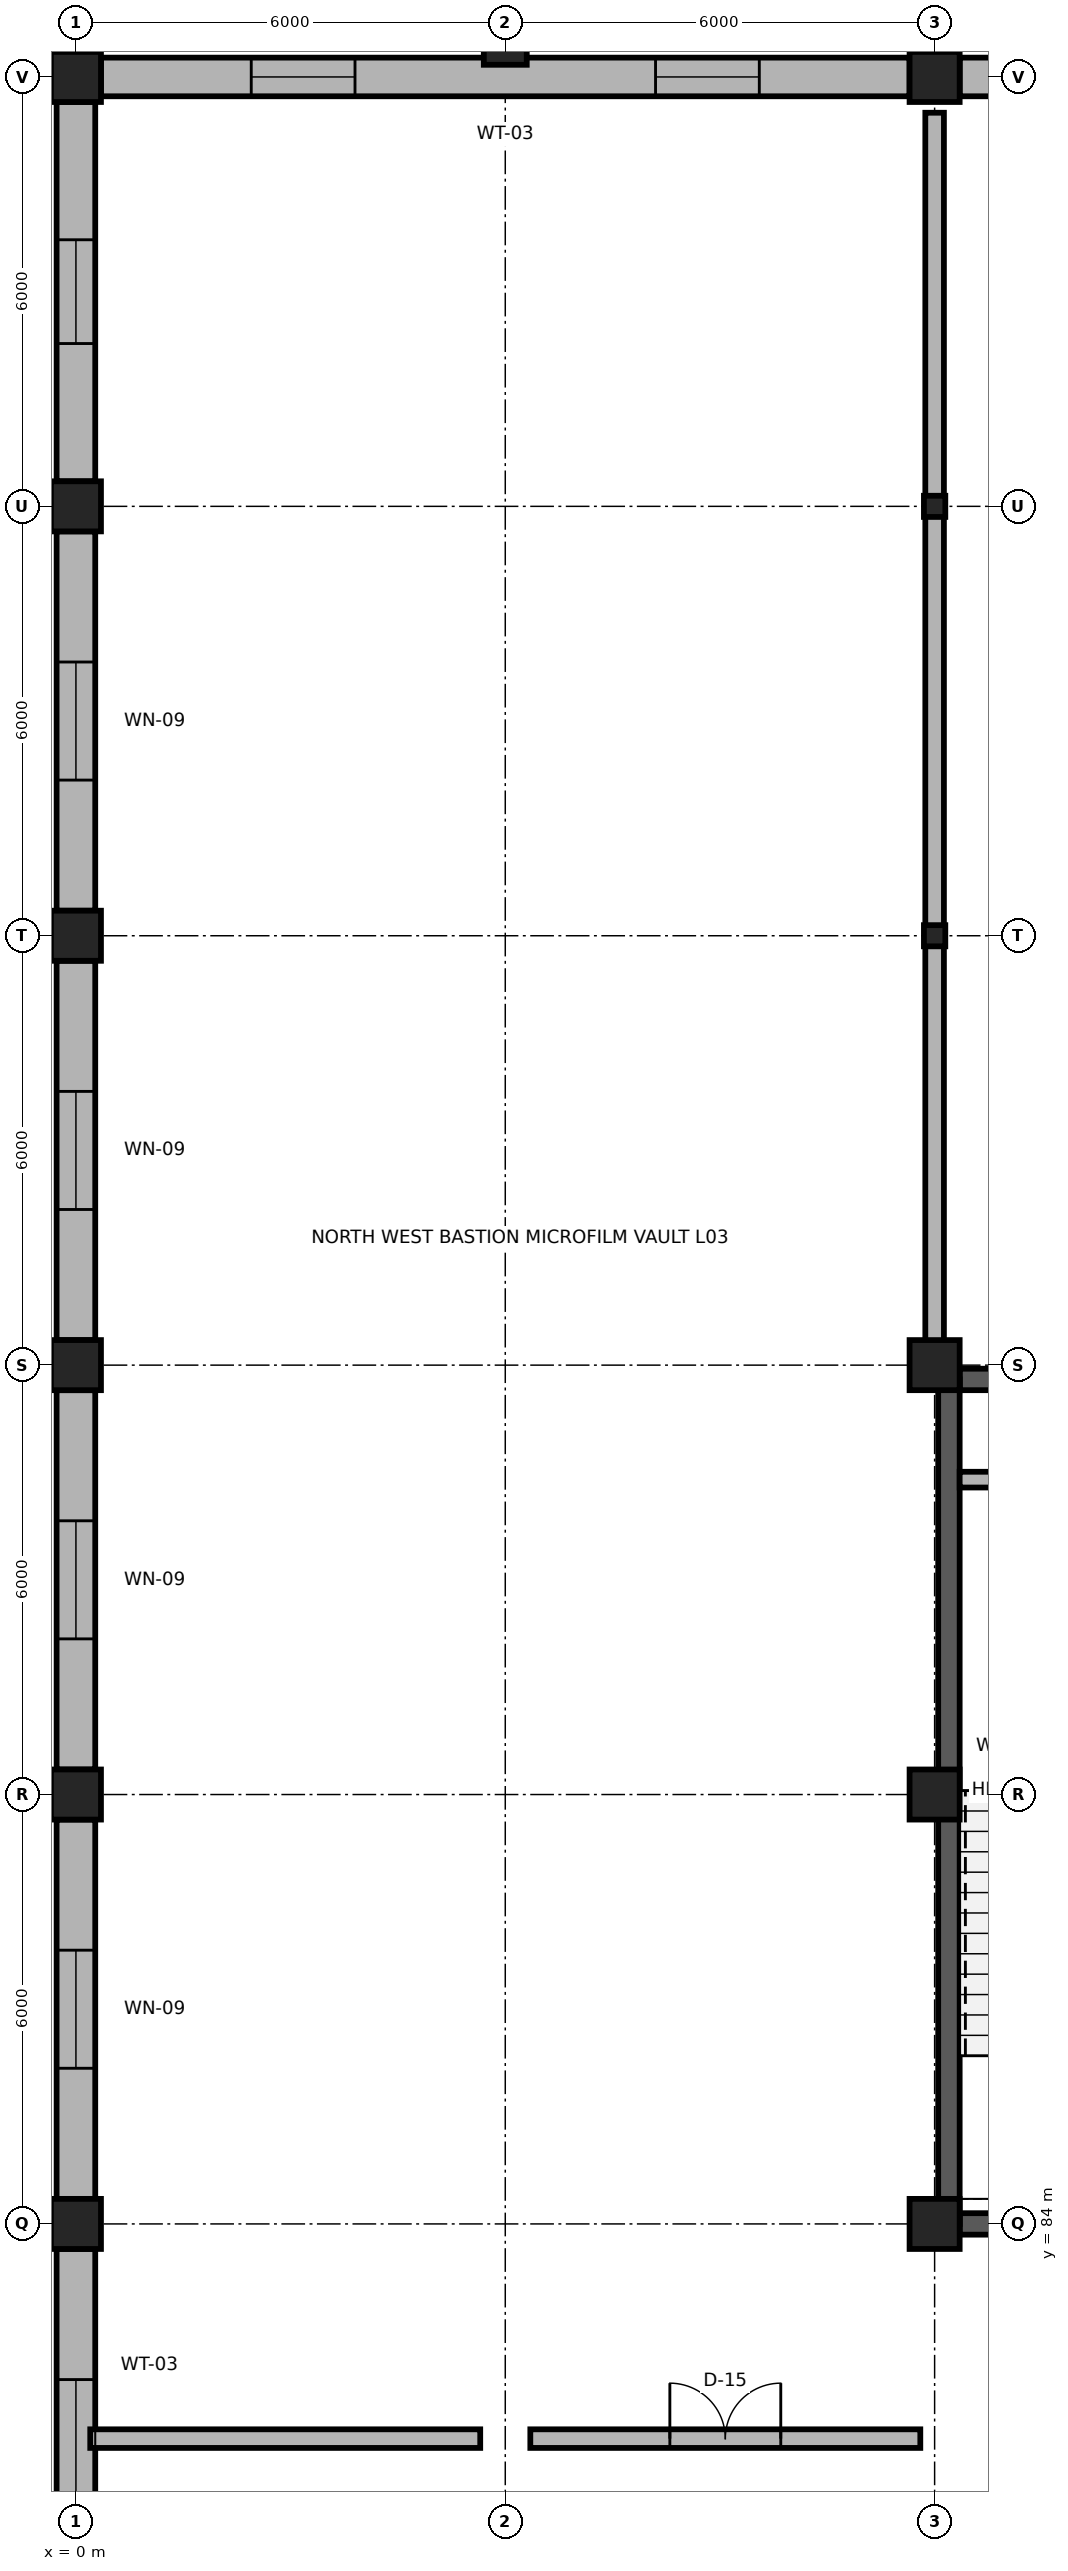
"""IFC4 building model, lengths in metres.
Left out: names, types, materials, properties, quantities, classifications, styles, units other than length and angle.
Written with IfcOpenShell. Run it as: python <this file> out.ifc"""

import sys

from ifc_helpers import new_model, si_unit, direction, frame, frame_2d, origin, origin_2d, place, context, subcontext, project, spatial, rectangle, i_section, extrude, element, fill, save


model = new_model("IFC4")
c1 = context("Model", 3, precision=1e-05, world=origin(), true_north=direction((0.0, 1.0)))
c2 = subcontext(c1, "Body", "Model", "MODEL_VIEW")
j1 = project(units=[si_unit("LENGTHUNIT", "METRE"), si_unit("PLANEANGLEUNIT", "RADIAN")], contexts=[c1])
p1 = place(None, origin())
s1 = spatial("IfcSite", under=j1, at=p1, CompositionType="ELEMENT")
p2 = place(p1, origin())
s2 = spatial("IfcBuilding", under=s1, at=p2, CompositionType="ELEMENT")
p3 = place(p2, frame((0.0, 0.0, 12.0)))
s3 = spatial("IfcBuildingStorey", under=s2, at=p3, CompositionType="ELEMENT", Elevation=12.0)
for number, where, z_axis, x_axis in (
    (1, (0.0, 84.0, 0.0), (0.0, 0.0, 1.0), (1.0, 0.0, 0.0)),
    (2, (12.0, 84.0, 0.0), (0.0, 0.0, 1.0), (1.0, 0.0, 0.0)),
    (3, (0.0, 90.0, 0.0), (0.0, 0.0, 1.0), (1.0, 0.0, 0.0)),
    (4, (12.0, 90.0, 0.0), (0.0, 0.0, 1.0), (1.0, 0.0, 0.0)),
    (5, (0.0, 96.0, 0.0), (0.0, 0.0, 1.0), (1.0, 0.0, 0.0)),
    (6, (12.0, 96.0, 0.0), (0.0, 0.0, 1.0), (1.0, 0.0, 0.0)),
    (7, (0.0, 102.0, 0.0), (0.0, 0.0, 1.0), (1.0, 0.0, 0.0)),
):
    element("IfcColumn", number, at=place(p3, frame(where, z_axis=z_axis, x_axis=x_axis)), inside=s3, PredefinedType="COLUMN", context=c2, shape_type="SweptSolid", body=[
        extrude(rectangle(XDim=0.7, YDim=0.7, at=origin_2d()), origin(), (0.0, 0.0, 1.0), 4.5),
    ])
p4 = place(p3, frame((12.0, 102.0, 0.0), z_axis=(0.0, 0.0, 1.0), x_axis=(1.0, 0.0, 0.0)))
e8 = element("IfcColumn", 8, at=p4, inside=s3, PredefinedType="COLUMN", context=c2, shape_type="SweptSolid", body=[
    extrude(i_section(OverallWidth=0.299, OverallDepth=0.296, WebThickness=0.009, FlangeThickness=0.014, FilletRadius=0.018, at=origin_2d()), origin(), (0.0, 0.0, 1.0), 4.5),
])
p5 = place(p3, frame((0.0, 108.0, 0.0), z_axis=(0.0, 0.0, 1.0), x_axis=(1.0, 0.0, 0.0)))
e9 = element("IfcColumn", 9, at=p5, inside=s3, PredefinedType="COLUMN", context=c2, shape_type="SweptSolid", body=[
    extrude(rectangle(XDim=0.7, YDim=0.7, at=origin_2d()), origin(), (0.0, 0.0, 1.0), 4.5),
])
p6 = place(p3, frame((12.0, 108.0, 0.0), z_axis=(0.0, 0.0, 1.0), x_axis=(1.0, 0.0, 0.0)))
e10 = element("IfcColumn", 10, at=p6, inside=s3, PredefinedType="COLUMN", context=c2, shape_type="SweptSolid", body=[
    extrude(i_section(OverallWidth=0.299, OverallDepth=0.296, WebThickness=0.009, FlangeThickness=0.014, FilletRadius=0.018, at=origin_2d()), origin(), (0.0, 0.0, 1.0), 4.5),
])
for number, where, z_axis, x_axis in (
    (11, (0.0, 114.0, 0.0), (0.0, 0.0, 1.0), (1.0, 0.0, 0.0)),
    (12, (12.0, 114.0, 0.0), (0.0, 0.0, 1.0), (1.0, 0.0, 0.0)),
):
    element("IfcColumn", number, at=place(p3, frame(where, z_axis=z_axis, x_axis=x_axis)), inside=s3, PredefinedType="COLUMN", context=c2, shape_type="SweptSolid", body=[
        extrude(rectangle(XDim=0.7, YDim=0.7, at=origin_2d()), origin(), (0.0, 0.0, 1.0), 4.5),
    ])
p7 = place(p3, frame((6.0, 114.35, 0.0), z_axis=(0.0, 0.0, 1.0), x_axis=(1.0, 0.0, 0.0)))
e13 = element("IfcColumn", 13, at=p7, inside=s3, PredefinedType="PILASTER", context=c2, shape_type="SweptSolid", body=[
    extrude(rectangle(XDim=0.6, YDim=0.36, at=origin_2d()), origin(), (0.0, 0.0, 1.0), 4.22),
])
p8 = place(p3, frame((0.35, 114.0, 0.0), z_axis=(0.0, 0.0, 1.0), x_axis=(1.0, 0.0, 0.0)))
e14 = element("IfcWall", 14, at=p8, inside=s3, PredefinedType="SOLIDWALL", context=c2, shape_type="SweptSolid", body=[
    extrude(rectangle(XDim=11.3, YDim=0.54, at=frame_2d((5.65, 0.0))), origin(), (0.0, 0.0, 1.0), 3.77),
])
p9 = place(p8, frame((2.1, 0.0, 0.85)))
e15 = element("IfcOpeningElement", 15, at=p9, cuts=e14, PredefinedType="OPENING", context=c2, shape_type="SweptSolid", body=[
    extrude(rectangle(XDim=1.45, YDim=2.15, at=frame_2d((0.725, 1.075))), frame((0.0, 0.285, 0.0), z_axis=(0.0, -1.0, 0.0), x_axis=(1.0, 0.0, 0.0)), (0.0, 0.0, 1.0), 0.57),
])
p10 = place(p8, frame((7.75, 0.0, 0.85)))
e16 = element("IfcOpeningElement", 16, at=p10, cuts=e14, PredefinedType="OPENING", context=c2, shape_type="SweptSolid", body=[
    extrude(rectangle(XDim=1.45, YDim=2.15, at=frame_2d((0.725, 1.075))), frame((0.0, 0.285, 0.0), z_axis=(0.0, -1.0, 0.0), x_axis=(1.0, 0.0, 0.0)), (0.0, 0.0, 1.0), 0.57),
])
p11 = place(p3, frame((12.35, 114.0, 0.0), z_axis=(0.0, 0.0, 1.0), x_axis=(1.0, 0.0, 0.0)))
e17 = element("IfcWall", 17, at=p11, inside=s3, PredefinedType="SOLIDWALL", context=c2, shape_type="SweptSolid", body=[
    extrude(rectangle(XDim=5.3, YDim=0.54, at=frame_2d((2.65, 0.0))), origin(), (0.0, 0.0, 1.0), 3.77),
])
p12 = place(p3, frame((0.0, 78.35, 0.0), z_axis=(0.0, 0.0, 1.0), x_axis=(0.0, 1.0, 0.0)))
e18 = element("IfcWall", 18, at=p12, inside=s3, PredefinedType="SOLIDWALL", context=c2, shape_type="SweptSolid", body=[
    extrude(rectangle(XDim=5.3, YDim=0.54, at=frame_2d((2.65, 0.0))), origin(), (0.0, 0.0, 1.0), 3.77),
])
p13 = place(p12, frame((1.825, 0.0, 0.85)))
e19 = element("IfcOpeningElement", 19, at=p13, cuts=e18, PredefinedType="OPENING", context=c2, shape_type="SweptSolid", body=[
    extrude(rectangle(XDim=1.65, YDim=2.3, at=frame_2d((0.825, 1.15))), frame((0.0, 0.285, 0.0), z_axis=(0.0, -1.0, 0.0), x_axis=(1.0, 0.0, 0.0)), (0.0, 0.0, 1.0), 0.57),
])
p14 = place(p3, frame((0.0, 84.35, 0.0), z_axis=(0.0, 0.0, 1.0), x_axis=(0.0, 1.0, 0.0)))
e20 = element("IfcWall", 20, at=p14, inside=s3, PredefinedType="SOLIDWALL", context=c2, shape_type="SweptSolid", body=[
    extrude(rectangle(XDim=5.3, YDim=0.54, at=frame_2d((2.65, 0.0))), origin(), (0.0, 0.0, 1.0), 3.77),
])
p15 = place(p14, frame((1.825, 0.0, 0.85)))
e21 = element("IfcOpeningElement", 21, at=p15, cuts=e20, PredefinedType="OPENING", context=c2, shape_type="SweptSolid", body=[
    extrude(rectangle(XDim=1.65, YDim=2.3, at=frame_2d((0.825, 1.15))), frame((0.0, 0.285, 0.0), z_axis=(0.0, -1.0, 0.0), x_axis=(1.0, 0.0, 0.0)), (0.0, 0.0, 1.0), 0.57),
])
p16 = place(p3, frame((0.0, 90.35, 0.0), z_axis=(0.0, 0.0, 1.0), x_axis=(0.0, 1.0, 0.0)))
e22 = element("IfcWall", 22, at=p16, inside=s3, PredefinedType="SOLIDWALL", context=c2, shape_type="SweptSolid", body=[
    extrude(rectangle(XDim=5.3, YDim=0.54, at=frame_2d((2.65, 0.0))), origin(), (0.0, 0.0, 1.0), 3.77),
])
p17 = place(p16, frame((1.825, 0.0, 0.85)))
e23 = element("IfcOpeningElement", 23, at=p17, cuts=e22, PredefinedType="OPENING", context=c2, shape_type="SweptSolid", body=[
    extrude(rectangle(XDim=1.65, YDim=2.3, at=frame_2d((0.825, 1.15))), frame((0.0, 0.285, 0.0), z_axis=(0.0, -1.0, 0.0), x_axis=(1.0, 0.0, 0.0)), (0.0, 0.0, 1.0), 0.57),
])
p18 = place(p3, frame((0.0, 96.35, 0.0), z_axis=(0.0, 0.0, 1.0), x_axis=(0.0, 1.0, 0.0)))
e24 = element("IfcWall", 24, at=p18, inside=s3, PredefinedType="SOLIDWALL", context=c2, shape_type="SweptSolid", body=[
    extrude(rectangle(XDim=5.3, YDim=0.54, at=frame_2d((2.65, 0.0))), origin(), (0.0, 0.0, 1.0), 3.77),
])
p19 = place(p18, frame((1.825, 0.0, 0.85)))
e25 = element("IfcOpeningElement", 25, at=p19, cuts=e24, PredefinedType="OPENING", context=c2, shape_type="SweptSolid", body=[
    extrude(rectangle(XDim=1.65, YDim=2.3, at=frame_2d((0.825, 1.15))), frame((0.0, 0.285, 0.0), z_axis=(0.0, -1.0, 0.0), x_axis=(1.0, 0.0, 0.0)), (0.0, 0.0, 1.0), 0.57),
])
p20 = place(p3, frame((0.0, 102.35, 0.0), z_axis=(0.0, 0.0, 1.0), x_axis=(0.0, 1.0, 0.0)))
e26 = element("IfcWall", 26, at=p20, inside=s3, PredefinedType="SOLIDWALL", context=c2, shape_type="SweptSolid", body=[
    extrude(rectangle(XDim=5.3, YDim=0.54, at=frame_2d((2.65, 0.0))), origin(), (0.0, 0.0, 1.0), 3.77),
])
p21 = place(p20, frame((1.825, 0.0, 0.85)))
e27 = element("IfcOpeningElement", 27, at=p21, cuts=e26, PredefinedType="OPENING", context=c2, shape_type="SweptSolid", body=[
    extrude(rectangle(XDim=1.65, YDim=2.3, at=frame_2d((0.825, 1.15))), frame((0.0, 0.285, 0.0), z_axis=(0.0, -1.0, 0.0), x_axis=(1.0, 0.0, 0.0)), (0.0, 0.0, 1.0), 0.57),
])
p22 = place(p3, frame((0.0, 108.35, 0.0), z_axis=(0.0, 0.0, 1.0), x_axis=(0.0, 1.0, 0.0)))
e28 = element("IfcWall", 28, at=p22, inside=s3, PredefinedType="SOLIDWALL", context=c2, shape_type="SweptSolid", body=[
    extrude(rectangle(XDim=5.3, YDim=0.54, at=frame_2d((2.65, 0.0))), origin(), (0.0, 0.0, 1.0), 3.77),
])
p23 = place(p22, frame((1.925, 0.0, 0.85)))
e29 = element("IfcOpeningElement", 29, at=p23, cuts=e28, PredefinedType="OPENING", context=c2, shape_type="SweptSolid", body=[
    extrude(rectangle(XDim=1.45, YDim=2.15, at=frame_2d((0.725, 1.075))), frame((0.0, 0.285, 0.0), z_axis=(0.0, -1.0, 0.0), x_axis=(1.0, 0.0, 0.0)), (0.0, 0.0, 1.0), 0.57),
])
p24 = place(p3, frame((12.35, 84.0, 0.0), z_axis=(0.0, 0.0, 1.0), x_axis=(1.0, 0.0, 0.0)))
e30 = element("IfcWall", 30, at=p24, inside=s3, PredefinedType="SHEAR", context=c2, shape_type="SweptSolid", body=[
    extrude(rectangle(XDim=5.3, YDim=0.3, at=frame_2d((2.65, 0.0))), origin(), (0.0, 0.0, 1.0), 4.22),
])
p25 = place(p24, frame((1.925, 0.0, 0.0)))
e31 = element("IfcOpeningElement", 31, at=p25, cuts=e30, PredefinedType="OPENING", context=c2, shape_type="SweptSolid", body=[
    extrude(rectangle(XDim=1.45, YDim=2.25, at=frame_2d((0.725, 1.125))), frame((0.0, 0.165, 0.0), z_axis=(0.0, -1.0, 0.0), x_axis=(1.0, 0.0, 0.0)), (0.0, 0.0, 1.0), 0.33),
])
p26 = place(p3, frame((12.35, 95.8, 0.0), z_axis=(0.0, 0.0, 1.0), x_axis=(1.0, 0.0, 0.0)))
e32 = element("IfcWall", 32, at=p26, inside=s3, PredefinedType="SHEAR", context=c2, shape_type="SweptSolid", body=[
    extrude(rectangle(XDim=5.3, YDim=0.3, at=frame_2d((2.65, 0.0))), origin(), (0.0, 0.0, 1.0), 4.22),
])
p27 = place(p3, frame((12.2, 84.0, 0.0), z_axis=(0.0, 0.0, 1.0), x_axis=(0.0, 1.0, 0.0)))
e33 = element("IfcWall", 33, at=p27, inside=s3, PredefinedType="SHEAR", context=c2, shape_type="SweptSolid", body=[
    extrude(rectangle(XDim=11.8, YDim=0.3, at=frame_2d((5.9, 0.0))), origin(), (0.0, 0.0, 1.0), 4.22),
])
p28 = place(p3, frame((12.35, 94.4, 0.0), z_axis=(0.0, 0.0, 1.0), x_axis=(1.0, 0.0, 0.0)))
e34 = element("IfcWall", 34, at=p28, inside=s3, PredefinedType="PARTITIONING", context=c2, shape_type="SweptSolid", body=[
    extrude(rectangle(XDim=1.1, YDim=0.22, at=frame_2d((0.55, 0.0))), origin(), (0.0, 0.0, 1.0), 4.22),
])
p29 = place(p3, frame((6.35, 81.0, 0.0), z_axis=(0.0, 0.0, 1.0), x_axis=(1.0, 0.0, 0.0)))
e35 = element("IfcWall", 35, at=p29, inside=s3, PredefinedType="PARTITIONING", context=c2, shape_type="SweptSolid", body=[
    extrude(rectangle(XDim=5.45, YDim=0.26, at=frame_2d((2.725, 0.0))), origin(), (0.0, 0.0, 1.0), 4.22),
])
p30 = place(p29, frame((1.95, 0.0, 0.0)))
e36 = element("IfcOpeningElement", 36, at=p30, cuts=e35, PredefinedType="OPENING", context=c2, shape_type="SweptSolid", body=[
    extrude(rectangle(XDim=1.55, YDim=2.3, at=frame_2d((0.775, 1.15))), frame((0.0, 0.145, 0.0), z_axis=(0.0, -1.0, 0.0), x_axis=(1.0, 0.0, 0.0)), (0.0, 0.0, 1.0), 0.29),
])
p31 = place(p3, frame((0.2, 81.0, 0.0), z_axis=(0.0, 0.0, 1.0), x_axis=(1.0, 0.0, 0.0)))
e37 = element("IfcWall", 37, at=p31, inside=s3, PredefinedType="PARTITIONING", context=c2, shape_type="SweptSolid", body=[
    extrude(rectangle(XDim=5.45, YDim=0.26, at=frame_2d((2.725, 0.0))), origin(), (0.0, 0.0, 1.0), 4.22),
])
p32 = place(p3, frame((12.0, 96.2, 0.0), z_axis=(0.0, 0.0, 1.0), x_axis=(0.0, 1.0, 0.0)))
e38 = element("IfcWall", 38, at=p32, inside=s3, PredefinedType="PARTITIONING", context=c2, shape_type="SweptSolid", body=[
    extrude(rectangle(XDim=17.3, YDim=0.26, at=frame_2d((8.65, 0.0))), origin(), (0.0, 0.0, 1.0), 3.738),
])
p33 = place(p9, origin())
e39 = element("IfcWindow", 39, at=p33, inside=s3, PartitioningType="SINGLE_PANEL", PredefinedType="WINDOW", context=c2, shape_type="SweptSolid", body=[
    extrude(rectangle(XDim=1.45, YDim=2.15, at=frame_2d((0.725, 1.075))), frame((0.0, 0.03, 0.0), z_axis=(0.0, -1.0, 0.0), x_axis=(1.0, 0.0, 0.0)), (0.0, 0.0, 1.0), 0.06),
])
fill(e15, e39)
p34 = place(p10, origin())
e40 = element("IfcWindow", 40, at=p34, inside=s3, PartitioningType="SINGLE_PANEL", PredefinedType="WINDOW", context=c2, shape_type="SweptSolid", body=[
    extrude(rectangle(XDim=1.45, YDim=2.15, at=frame_2d((0.725, 1.075))), frame((0.0, 0.03, 0.0), z_axis=(0.0, -1.0, 0.0), x_axis=(1.0, 0.0, 0.0)), (0.0, 0.0, 1.0), 0.06),
])
fill(e16, e40)
p35 = place(p13, origin())
e41 = element("IfcWindow", 41, at=p35, inside=s3, PartitioningType="SINGLE_PANEL", PredefinedType="WINDOW", context=c2, shape_type="SweptSolid", body=[
    extrude(rectangle(XDim=1.65, YDim=2.3, at=frame_2d((0.825, 1.15))), frame((0.0, 0.03, 0.0), z_axis=(0.0, -1.0, 0.0), x_axis=(1.0, 0.0, 0.0)), (0.0, 0.0, 1.0), 0.06),
])
fill(e19, e41)
p36 = place(p15, origin())
e42 = element("IfcWindow", 42, at=p36, inside=s3, PartitioningType="SINGLE_PANEL", PredefinedType="WINDOW", context=c2, shape_type="SweptSolid", body=[
    extrude(rectangle(XDim=1.65, YDim=2.3, at=frame_2d((0.825, 1.15))), frame((0.0, 0.03, 0.0), z_axis=(0.0, -1.0, 0.0), x_axis=(1.0, 0.0, 0.0)), (0.0, 0.0, 1.0), 0.06),
])
fill(e21, e42)
p37 = place(p17, origin())
e43 = element("IfcWindow", 43, at=p37, inside=s3, PartitioningType="SINGLE_PANEL", PredefinedType="WINDOW", context=c2, shape_type="SweptSolid", body=[
    extrude(rectangle(XDim=1.65, YDim=2.3, at=frame_2d((0.825, 1.15))), frame((0.0, 0.03, 0.0), z_axis=(0.0, -1.0, 0.0), x_axis=(1.0, 0.0, 0.0)), (0.0, 0.0, 1.0), 0.06),
])
fill(e23, e43)
p38 = place(p19, origin())
e44 = element("IfcWindow", 44, at=p38, inside=s3, PartitioningType="SINGLE_PANEL", PredefinedType="WINDOW", context=c2, shape_type="SweptSolid", body=[
    extrude(rectangle(XDim=1.65, YDim=2.3, at=frame_2d((0.825, 1.15))), frame((0.0, 0.03, 0.0), z_axis=(0.0, -1.0, 0.0), x_axis=(1.0, 0.0, 0.0)), (0.0, 0.0, 1.0), 0.06),
])
fill(e25, e44)
p39 = place(p21, origin())
e45 = element("IfcWindow", 45, at=p39, inside=s3, PartitioningType="SINGLE_PANEL", PredefinedType="WINDOW", context=c2, shape_type="SweptSolid", body=[
    extrude(rectangle(XDim=1.65, YDim=2.3, at=frame_2d((0.825, 1.15))), frame((0.0, 0.03, 0.0), z_axis=(0.0, -1.0, 0.0), x_axis=(1.0, 0.0, 0.0)), (0.0, 0.0, 1.0), 0.06),
])
fill(e27, e45)
p40 = place(p23, origin())
e46 = element("IfcWindow", 46, at=p40, inside=s3, PartitioningType="SINGLE_PANEL", PredefinedType="WINDOW", context=c2, shape_type="SweptSolid", body=[
    extrude(rectangle(XDim=1.45, YDim=2.15, at=frame_2d((0.725, 1.075))), frame((0.0, 0.03, 0.0), z_axis=(0.0, -1.0, 0.0), x_axis=(1.0, 0.0, 0.0)), (0.0, 0.0, 1.0), 0.06),
])
fill(e29, e46)
p41 = place(p30, origin())
e47 = element("IfcDoor", 47, at=p41, inside=s3, OperationType="DOUBLE_DOOR_SINGLE_SWING", PredefinedType="DOOR", context=c2, shape_type="SweptSolid", body=[
    extrude(rectangle(XDim=1.55, YDim=2.3, at=frame_2d((0.775, 1.15))), frame((0.0, 0.025, 0.0), z_axis=(0.0, -1.0, 0.0), x_axis=(1.0, 0.0, 0.0)), (0.0, 0.0, 1.0), 0.05),
])
fill(e36, e47)
save(model, sys.argv[1])
